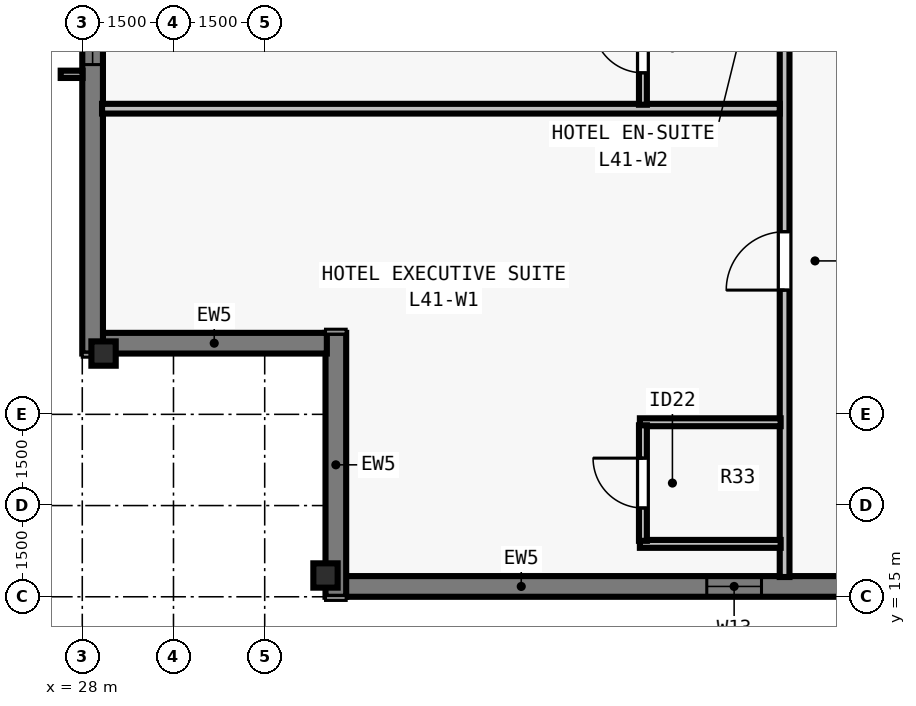
"""IFC4 building model, lengths in metres.
Left out: names, types, materials, properties, quantities, classifications, styles, units other than length and angle.
Written with IfcOpenShell. Run it as: python <this file> out.ifc"""

import sys

from ifc_helpers import new_model, si_unit, direction, frame, frame_2d, origin, origin_2d, place, context, subcontext, project, spatial, rectangle, i_section, extrude, element, fill, save


model = new_model("IFC4")
c1 = context("Model", 3, precision=1e-05, world=origin(), true_north=direction((0.0, 1.0)))
c2 = subcontext(c1, "Body", "Model", "MODEL_VIEW")
j1 = project(units=[si_unit("LENGTHUNIT", "METRE"), si_unit("PLANEANGLEUNIT", "RADIAN")], contexts=[c1])
p1 = place(None, origin())
s1 = spatial("IfcSite", under=j1, at=p1, CompositionType="ELEMENT")
p2 = place(p1, origin())
s2 = spatial("IfcBuilding", under=s1, at=p2, CompositionType="ELEMENT")
p3 = place(p2, frame((0.0, 0.0, 151.5)))
s3 = spatial("IfcBuildingStorey", under=s2, at=p3, CompositionType="ELEMENT", Elevation=151.5)
for number, where, z_axis, x_axis in (
    (1, (32.0, 15.35, 0.0), (0.0, 0.0, 1.0), (1.0, 0.0, 0.0)),
    (2, (28.35, 19.0, 0.0), (0.0, 0.0, 1.0), (0.0, 1.0, 0.0)),
):
    element("IfcColumn", number, at=place(p3, frame(where, z_axis=z_axis, x_axis=x_axis)), inside=s3, PredefinedType="COLUMN", context=c2, shape_type="SweptSolid", body=[
        extrude(i_section(OverallWidth=0.4, OverallDepth=0.4, WebThickness=0.022, FlangeThickness=0.036, at=origin_2d()), origin(), (0.0, 0.0, 1.0), 3.5),
    ])
p4 = place(p3, frame((47.8, 15.17, 0.0), z_axis=(0.0, 0.0, 1.0), x_axis=(-1.0, 0.0, 0.0)))
e3 = element("IfcWall", 3, at=p4, inside=s3, PredefinedType="SOLIDWALL", context=c2, shape_type="SweptSolid", body=[
    extrude(rectangle(XDim=15.482, YDim=0.34, at=frame_2d((7.741, 0.0))), origin(), (0.0, 0.0, 1.0), 3.28),
])
p5 = place(p4, frame((2.105, 0.0, 0.8)))
e4 = element("IfcOpeningElement", 4, at=p5, cuts=e3, PredefinedType="OPENING", context=c2, shape_type="SweptSolid", body=[
    extrude(rectangle(XDim=1.75, YDim=1.66, at=frame_2d((0.875, 0.83))), frame((0.0, 0.18, 0.0), z_axis=(0.0, -1.0, 0.0), x_axis=(1.0, 0.0, 0.0)), (0.0, 0.0, 1.0), 0.36),
])
p6 = place(p4, frame((8.63, 0.0, 0.8)))
e5 = element("IfcOpeningElement", 5, at=p6, cuts=e3, PredefinedType="OPENING", context=c2, shape_type="SweptSolid", body=[
    extrude(rectangle(XDim=0.9, YDim=1.66, at=frame_2d((0.45, 0.83))), frame((0.0, 0.18, 0.0), z_axis=(0.0, -1.0, 0.0), x_axis=(1.0, 0.0, 0.0)), (0.0, 0.0, 1.0), 0.36),
])
p7 = place(p3, frame((32.17, 15.0, 0.0), z_axis=(0.0, 0.0, 1.0), x_axis=(0.0, 1.0, 0.0)))
e6 = element("IfcWall", 6, at=p7, inside=s3, PredefinedType="SOLIDWALL", context=c2, shape_type="SweptSolid", body=[
    extrude(rectangle(XDim=4.34, YDim=0.34, at=frame_2d((2.17, 0.0))), origin(), (0.0, 0.0, 1.0), 3.28),
])
p8 = place(p3, frame((32.022, 19.17, 0.0), z_axis=(0.0, 0.0, 1.0), x_axis=(-1.0, 0.0, 0.0)))
e7 = element("IfcWall", 7, at=p8, inside=s3, PredefinedType="SOLIDWALL", context=c2, shape_type="SweptSolid", body=[
    extrude(rectangle(XDim=3.704, YDim=0.34, at=frame_2d((1.852, 0.0))), origin(), (0.0, 0.0, 1.0), 3.28),
])
p9 = place(p3, frame((28.17, 19.0, 0.0), z_axis=(0.0, 0.0, 1.0), x_axis=(0.0, 1.0, 0.0)))
e8 = element("IfcWall", 8, at=p9, inside=s3, PredefinedType="SOLIDWALL", context=c2, shape_type="SweptSolid", body=[
    extrude(rectangle(XDim=39.682, YDim=0.34, at=frame_2d((19.841, 0.0))), origin(), (0.0, 0.0, 1.0), 3.28),
])
p10 = place(p9, frame((4.752, 0.0, 0.8)))
e9 = element("IfcOpeningElement", 9, at=p10, cuts=e8, PredefinedType="OPENING", context=c2, shape_type="SweptSolid", body=[
    extrude(rectangle(XDim=1.75, YDim=1.66, at=frame_2d((0.875, 0.83))), frame((0.0, 0.18, 0.0), z_axis=(0.0, -1.0, 0.0), x_axis=(1.0, 0.0, 0.0)), (0.0, 0.0, 1.0), 0.36),
])
p11 = place(p9, frame((8.505, 0.0, 0.8)))
e10 = element("IfcOpeningElement", 10, at=p11, cuts=e8, PredefinedType="OPENING", context=c2, shape_type="SweptSolid", body=[
    extrude(rectangle(XDim=1.35, YDim=1.66, at=frame_2d((0.675, 0.83))), frame((0.0, 0.18, 0.0), z_axis=(0.0, -1.0, 0.0), x_axis=(1.0, 0.0, 0.0)), (0.0, 0.0, 1.0), 0.36),
])
p12 = place(p9, frame((12.709, 0.0, 0.8)))
e11 = element("IfcOpeningElement", 11, at=p12, cuts=e8, PredefinedType="OPENING", context=c2, shape_type="SweptSolid", body=[
    extrude(rectangle(XDim=1.75, YDim=1.66, at=frame_2d((0.875, 0.83))), frame((0.0, 0.18, 0.0), z_axis=(0.0, -1.0, 0.0), x_axis=(1.0, 0.0, 0.0)), (0.0, 0.0, 1.0), 0.36),
])
p13 = place(p9, frame((16.062, 0.0, 0.8)))
e12 = element("IfcOpeningElement", 12, at=p13, cuts=e8, PredefinedType="OPENING", context=c2, shape_type="SweptSolid", body=[
    extrude(rectangle(XDim=1.35, YDim=1.66, at=frame_2d((0.675, 0.83))), frame((0.0, 0.18, 0.0), z_axis=(0.0, -1.0, 0.0), x_axis=(1.0, 0.0, 0.0)), (0.0, 0.0, 1.0), 0.36),
])
p14 = place(p9, frame((20.216, 0.0, 0.8)))
e13 = element("IfcOpeningElement", 13, at=p14, cuts=e8, PredefinedType="OPENING", context=c2, shape_type="SweptSolid", body=[
    extrude(rectangle(XDim=1.75, YDim=1.66, at=frame_2d((0.875, 0.83))), frame((0.0, 0.18, 0.0), z_axis=(0.0, -1.0, 0.0), x_axis=(1.0, 0.0, 0.0)), (0.0, 0.0, 1.0), 0.36),
])
p15 = place(p9, frame((22.719, 0.0, 0.8)))
e14 = element("IfcOpeningElement", 14, at=p15, cuts=e8, PredefinedType="OPENING", context=c2, shape_type="SweptSolid", body=[
    extrude(rectangle(XDim=1.35, YDim=1.66, at=frame_2d((0.675, 0.83))), frame((0.0, 0.18, 0.0), z_axis=(0.0, -1.0, 0.0), x_axis=(1.0, 0.0, 0.0)), (0.0, 0.0, 1.0), 0.36),
])
p16 = place(p9, frame((25.623, 0.0, 0.8)))
e15 = element("IfcOpeningElement", 15, at=p16, cuts=e8, PredefinedType="OPENING", context=c2, shape_type="SweptSolid", body=[
    extrude(rectangle(XDim=1.75, YDim=1.66, at=frame_2d((0.875, 0.83))), frame((0.0, 0.18, 0.0), z_axis=(0.0, -1.0, 0.0), x_axis=(1.0, 0.0, 0.0)), (0.0, 0.0, 1.0), 0.36),
])
p17 = place(p9, frame((29.827, 0.0, 0.8)))
e16 = element("IfcOpeningElement", 16, at=p17, cuts=e8, PredefinedType="OPENING", context=c2, shape_type="SweptSolid", body=[
    extrude(rectangle(XDim=1.35, YDim=1.66, at=frame_2d((0.675, 0.83))), frame((0.0, 0.18, 0.0), z_axis=(0.0, -1.0, 0.0), x_axis=(1.0, 0.0, 0.0)), (0.0, 0.0, 1.0), 0.36),
])
p18 = place(p9, frame((33.18, 0.0, 0.8)))
e17 = element("IfcOpeningElement", 17, at=p18, cuts=e8, PredefinedType="OPENING", context=c2, shape_type="SweptSolid", body=[
    extrude(rectangle(XDim=1.75, YDim=1.66, at=frame_2d((0.875, 0.83))), frame((0.0, 0.18, 0.0), z_axis=(0.0, -1.0, 0.0), x_axis=(1.0, 0.0, 0.0)), (0.0, 0.0, 1.0), 0.36),
])
p19 = place(p3, frame((39.55, 15.325, 0.0), z_axis=(0.0, 0.0, 1.0), x_axis=(0.0, 1.0, 0.0)))
e18 = element("IfcWall", 18, at=p19, inside=s3, PredefinedType="PARTITIONING", context=c2, shape_type="SweptSolid", body=[
    extrude(rectangle(XDim=47.35, YDim=0.16, at=frame_2d((23.675, 0.0))), origin(), (0.0, 0.0, 1.0), 2.555),
])
p20 = place(p19, frame((4.718, 0.0, 0.0)))
e19 = element("IfcOpeningElement", 19, at=p20, cuts=e18, PredefinedType="OPENING", context=c2, shape_type="SweptSolid", body=[
    extrude(rectangle(XDim=0.96, YDim=2.15, at=frame_2d((0.48, 1.075))), frame((0.0, 0.09, 0.0), z_axis=(0.0, -1.0, 0.0), x_axis=(1.0, 0.0, 0.0)), (0.0, 0.0, 1.0), 0.18),
])
p21 = place(p19, frame((12.441, 0.0, 0.0)))
e20 = element("IfcOpeningElement", 20, at=p21, cuts=e18, PredefinedType="OPENING", context=c2, shape_type="SweptSolid", body=[
    extrude(rectangle(XDim=0.96, YDim=2.15, at=frame_2d((0.48, 1.075))), frame((0.0, 0.09, 0.0), z_axis=(0.0, -1.0, 0.0), x_axis=(1.0, 0.0, 0.0)), (0.0, 0.0, 1.0), 0.18),
])
p22 = place(p19, frame((20.301, 0.0, 0.0)))
e21 = element("IfcOpeningElement", 21, at=p22, cuts=e18, PredefinedType="OPENING", context=c2, shape_type="SweptSolid", body=[
    extrude(rectangle(XDim=0.96, YDim=2.15, at=frame_2d((0.48, 1.075))), frame((0.0, 0.09, 0.0), z_axis=(0.0, -1.0, 0.0), x_axis=(1.0, 0.0, 0.0)), (0.0, 0.0, 1.0), 0.18),
])
p23 = place(p19, frame((28.161, 0.0, 0.0)))
e22 = element("IfcOpeningElement", 22, at=p23, cuts=e18, PredefinedType="OPENING", context=c2, shape_type="SweptSolid", body=[
    extrude(rectangle(XDim=0.96, YDim=2.15, at=frame_2d((0.48, 1.075))), frame((0.0, 0.09, 0.0), z_axis=(0.0, -1.0, 0.0), x_axis=(1.0, 0.0, 0.0)), (0.0, 0.0, 1.0), 0.18),
])
p24 = place(p19, frame((36.021, 0.0, 0.0)))
e23 = element("IfcOpeningElement", 23, at=p24, cuts=e18, PredefinedType="OPENING", context=c2, shape_type="SweptSolid", body=[
    extrude(rectangle(XDim=0.96, YDim=2.15, at=frame_2d((0.48, 1.075))), frame((0.0, 0.09, 0.0), z_axis=(0.0, -1.0, 0.0), x_axis=(1.0, 0.0, 0.0)), (0.0, 0.0, 1.0), 0.18),
])
p25 = place(p19, frame((43.793, 0.0, 0.0)))
e24 = element("IfcOpeningElement", 24, at=p25, cuts=e18, PredefinedType="OPENING", context=c2, shape_type="SweptSolid", body=[
    extrude(rectangle(XDim=0.96, YDim=2.15, at=frame_2d((0.48, 1.075))), frame((0.0, 0.09, 0.0), z_axis=(0.0, -1.0, 0.0), x_axis=(1.0, 0.0, 0.0)), (0.0, 0.0, 1.0), 0.18),
])
for number, where, z_axis, x_axis in (
    (25, (37.17, 15.87, 0.0), (0.0, 0.0, 1.0), (1.0, 0.0, 0.0)),
    (26, (37.17, 17.87, 0.0), (0.0, 0.0, 1.0), (1.0, 0.0, 0.0)),
):
    element("IfcWall", number, at=place(p3, frame(where, z_axis=z_axis, x_axis=x_axis)), inside=s3, PredefinedType="PLUMBINGWALL", context=c2, shape_type="SweptSolid", body=[
        extrude(rectangle(XDim=2.315, YDim=0.13, at=frame_2d((1.158, 0.0))), origin(), (0.0, 0.0, 1.0), 3.28),
    ])
p26 = place(p3, frame((37.22, 15.92, 0.0), z_axis=(0.0, 0.0, 1.0), x_axis=(0.0, 1.0, 0.0)))
e27 = element("IfcWall", 27, at=p26, inside=s3, PredefinedType="PLUMBINGWALL", context=c2, shape_type="SweptSolid", body=[
    extrude(rectangle(XDim=1.9, YDim=0.13, at=frame_2d((0.95, 0.0))), origin(), (0.0, 0.0, 1.0), 3.28),
])
p27 = place(p26, frame((0.54, 0.0, 0.0)))
e28 = element("IfcOpeningElement", 28, at=p27, cuts=e27, PredefinedType="OPENING", context=c2, shape_type="SweptSolid", body=[
    extrude(rectangle(XDim=0.82, YDim=2.1, at=frame_2d((0.41, 1.05))), frame((0.0, 0.075, 0.0), z_axis=(0.0, -1.0, 0.0), x_axis=(1.0, 0.0, 0.0)), (0.0, 0.0, 1.0), 0.15),
])
p28 = place(p3, frame((28.325, 23.027, 0.0), z_axis=(0.0, 0.0, 1.0), x_axis=(1.0, 0.0, 0.0)))
e29 = element("IfcWall", 29, at=p28, inside=s3, PredefinedType="PARTITIONING", context=c2, shape_type="SweptSolid", body=[
    extrude(rectangle(XDim=11.145, YDim=0.16, at=frame_2d((5.573, 0.0))), origin(), (0.0, 0.0, 1.0), 2.896),
])
p29 = place(p3, frame((37.22, 23.092, 0.0), z_axis=(0.0, 0.0, 1.0), x_axis=(0.0, 1.0, 0.0)))
e30 = element("IfcWall", 30, at=p29, inside=s3, PredefinedType="PLUMBINGWALL", context=c2, shape_type="SweptSolid", body=[
    extrude(rectangle(XDim=1.885, YDim=0.13, at=frame_2d((0.942, 0.0))), origin(), (0.0, 0.0, 1.0), 3.28),
])
p30 = place(p29, frame((0.525, 0.0, 0.0)))
e31 = element("IfcOpeningElement", 31, at=p30, cuts=e30, PredefinedType="OPENING", context=c2, shape_type="SweptSolid", body=[
    extrude(rectangle(XDim=0.82, YDim=2.1, at=frame_2d((0.41, 1.05))), frame((0.0, 0.075, 0.0), z_axis=(0.0, -1.0, 0.0), x_axis=(1.0, 0.0, 0.0)), (0.0, 0.0, 1.0), 0.15),
])
p31 = place(p10, origin())
e32 = element("IfcWindow", 32, at=p31, inside=s3, PartitioningType="SINGLE_PANEL", PredefinedType="WINDOW", context=c2, shape_type="SweptSolid", body=[
    extrude(rectangle(XDim=1.75, YDim=1.66, at=frame_2d((0.875, 0.83))), frame((0.0, -0.05, 0.0), z_axis=(0.0, -1.0, 0.0), x_axis=(1.0, 0.0, 0.0)), (0.0, 0.0, 1.0), 0.06),
])
fill(e9, e32)
p32 = place(p6, origin())
e33 = element("IfcWindow", 33, at=p32, inside=s3, PartitioningType="SINGLE_PANEL", PredefinedType="WINDOW", context=c2, shape_type="SweptSolid", body=[
    extrude(rectangle(XDim=0.9, YDim=1.66, at=frame_2d((0.45, 0.83))), frame((0.0, -0.04, 0.0), z_axis=(0.0, -1.0, 0.0), x_axis=(1.0, 0.0, 0.0)), (0.0, 0.0, 1.0), 0.06),
])
fill(e5, e33)
p33 = place(p27, origin())
e34 = element("IfcDoor", 34, at=p33, inside=s3, OperationType="SINGLE_SWING_RIGHT", PredefinedType="DOOR", context=c2, shape_type="SweptSolid", body=[
    extrude(rectangle(XDim=0.82, YDim=2.1, at=frame_2d((0.41, 1.05))), frame((0.0, 0.025, 0.0), z_axis=(0.0, -1.0, 0.0), x_axis=(1.0, 0.0, 0.0)), (0.0, 0.0, 1.0), 0.05),
])
fill(e28, e34)
p34 = place(p20, origin())
e35 = element("IfcDoor", 35, at=p34, inside=s3, OperationType="SINGLE_SWING_LEFT", PredefinedType="DOOR", context=c2, shape_type="SweptSolid", body=[
    extrude(rectangle(XDim=0.96, YDim=2.15, at=frame_2d((0.48, 1.075))), frame((0.0, 0.025, 0.0), z_axis=(0.0, -1.0, 0.0), x_axis=(1.0, 0.0, 0.0)), (0.0, 0.0, 1.0), 0.05),
])
fill(e19, e35)
p35 = place(p30, origin())
e36 = element("IfcDoor", 36, at=p35, inside=s3, OperationType="SINGLE_SWING_RIGHT", PredefinedType="DOOR", context=c2, shape_type="SweptSolid", body=[
    extrude(rectangle(XDim=0.82, YDim=2.1, at=frame_2d((0.41, 1.05))), frame((0.0, 0.025, 0.0), z_axis=(0.0, -1.0, 0.0), x_axis=(1.0, 0.0, 0.0)), (0.0, 0.0, 1.0), 0.05),
])
fill(e31, e36)
save(model, sys.argv[1])
